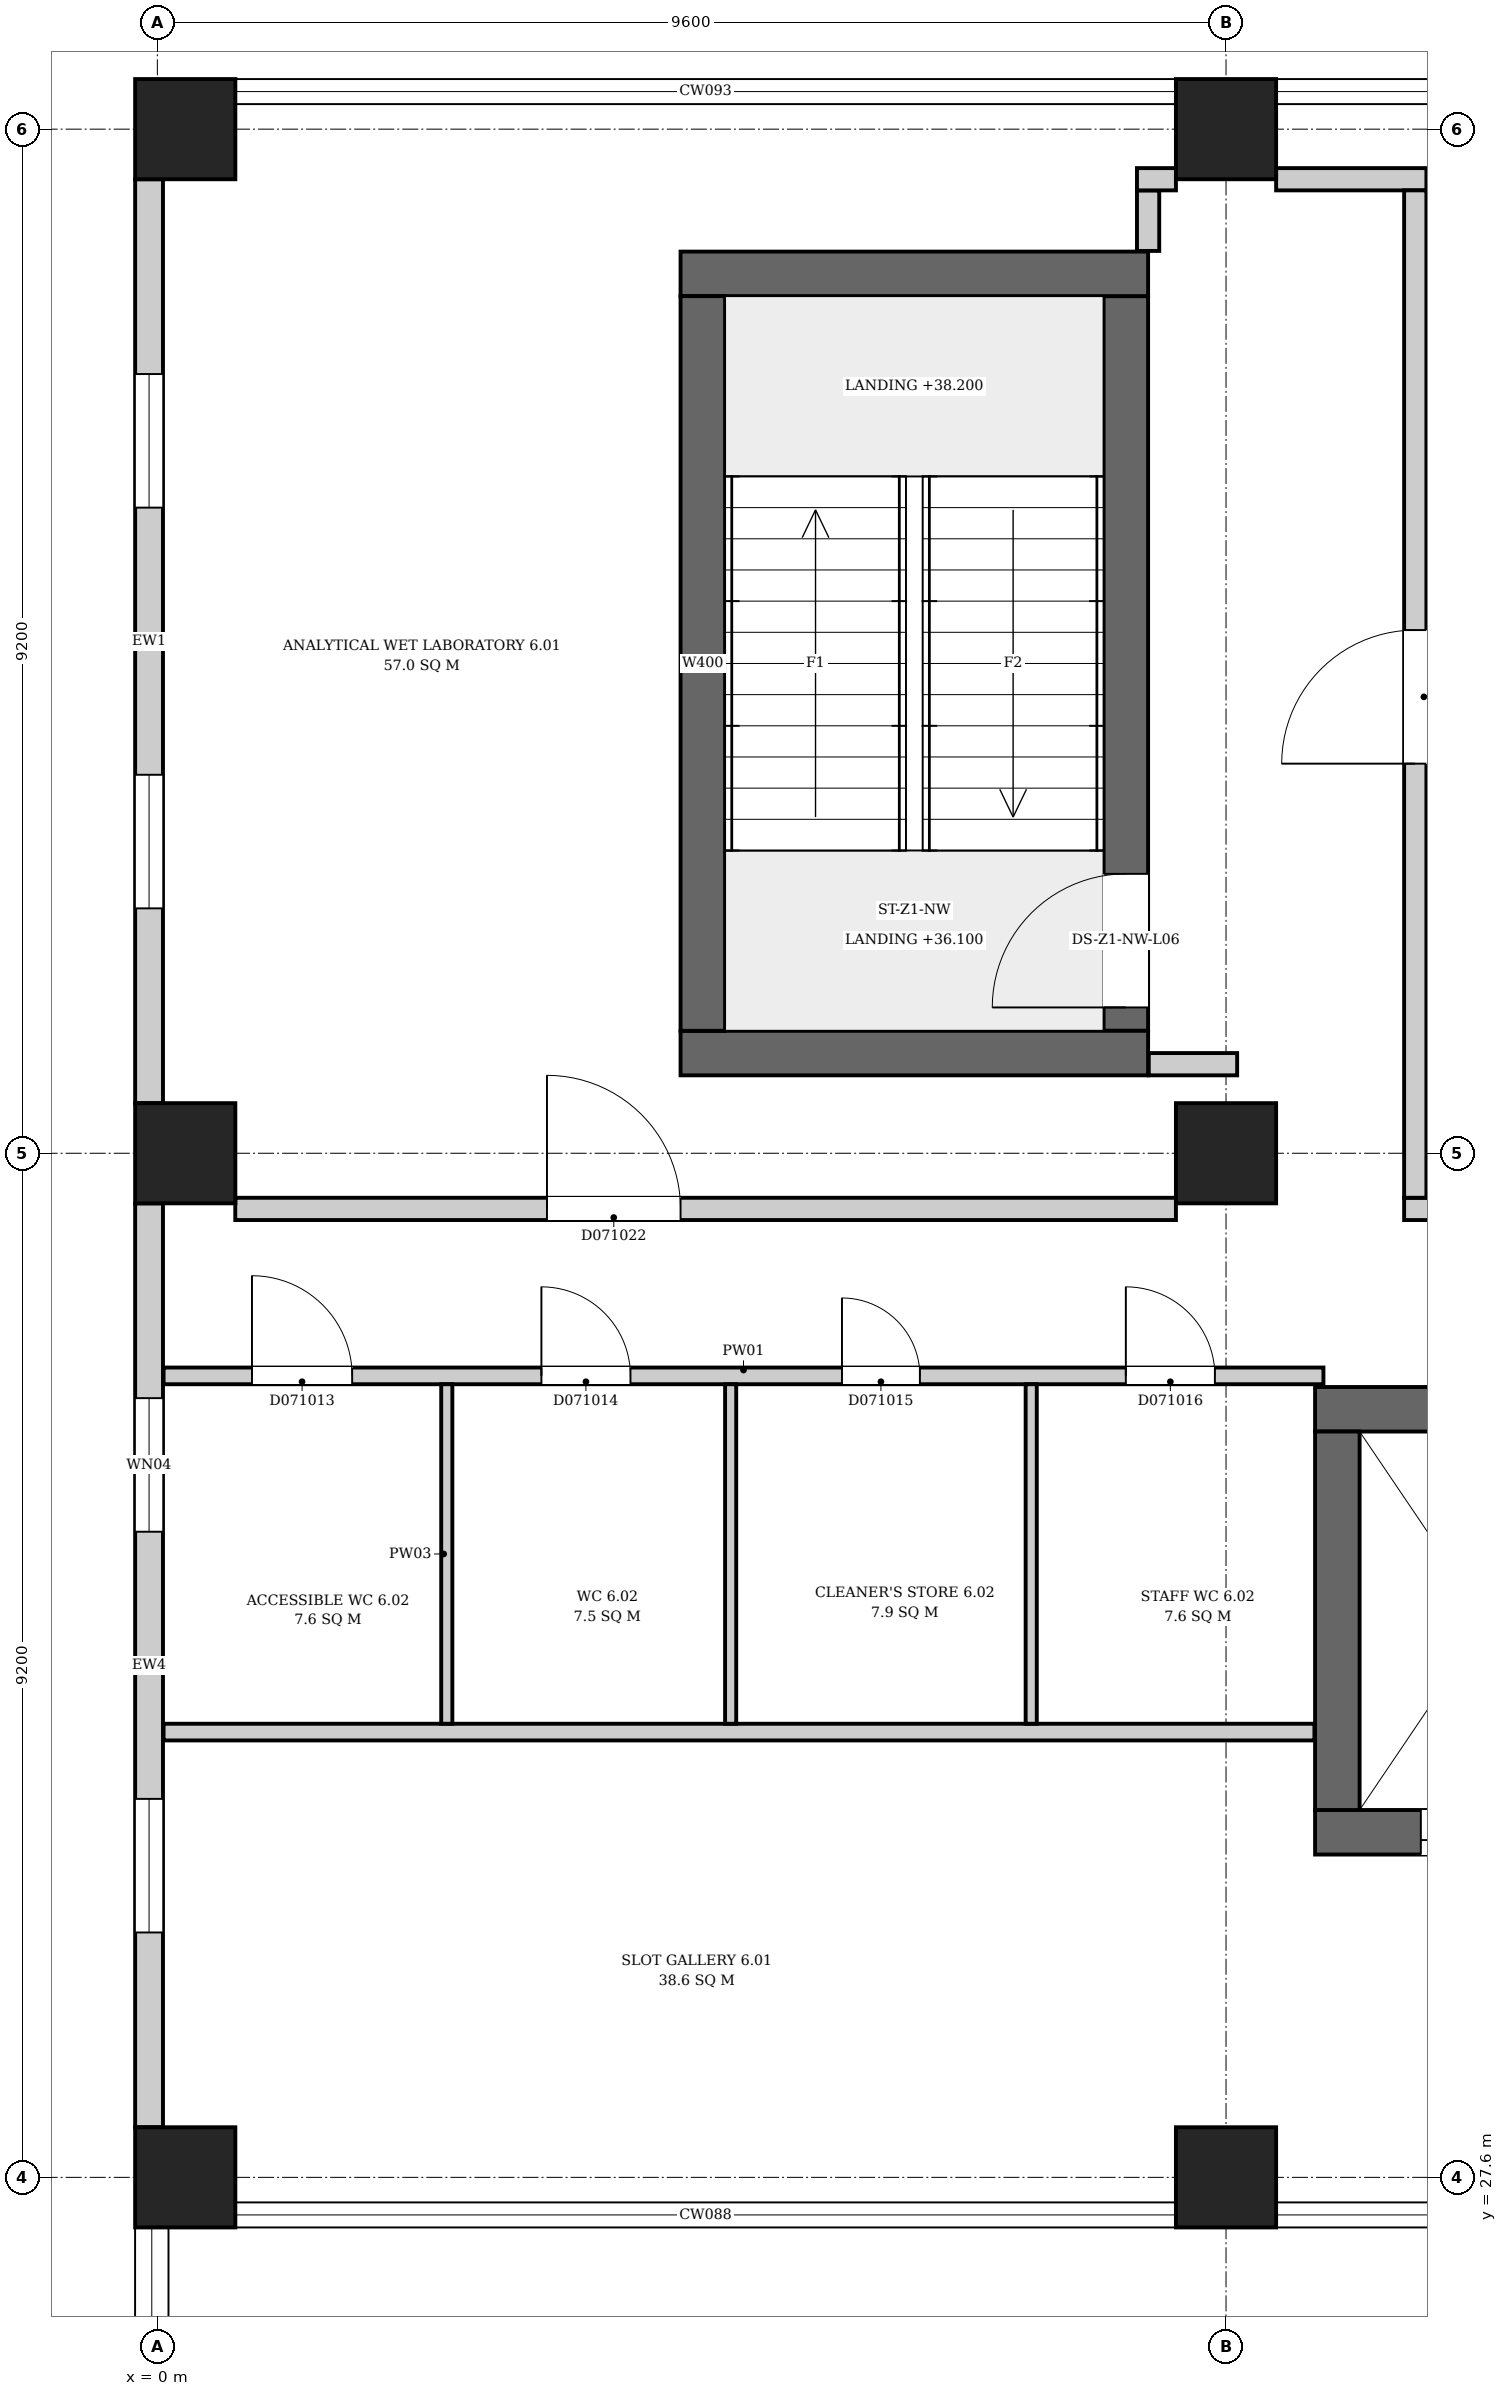
"""IFC4 building model, lengths in metres.
Left out: names, types, materials, properties, quantities, classifications, styles, units other than length and angle.
Written with IfcOpenShell. Run it as: python <this file> out.ifc"""

import sys

from ifc_helpers import new_model, si_unit, direction, frame, frame_2d, origin, origin_2d, place, context, subcontext, project, spatial, rectangle, extrude, element, fill, save


model = new_model("IFC4")
c1 = context("Model", 3, precision=1e-05, world=origin(), true_north=direction((0.0, 1.0)))
c2 = subcontext(c1, "Body", "Model", "MODEL_VIEW")
j1 = project(units=[si_unit("LENGTHUNIT", "METRE"), si_unit("PLANEANGLEUNIT", "RADIAN")], contexts=[c1])
p1 = place(None, origin())
s1 = spatial("IfcSite", under=j1, at=p1, CompositionType="ELEMENT")
p2 = place(p1, origin())
s2 = spatial("IfcBuilding", under=s1, at=p2, CompositionType="ELEMENT")
p3 = place(p2, frame((0.0, 0.0, 36.1)))
s3 = spatial("IfcBuildingStorey", under=s2, at=p3, CompositionType="ELEMENT", Elevation=36.1)
for number, where, z_axis, x_axis in (
    (1, (4.7, 37.7, 0.0), (0.0, 0.0, 1.0), (1.0, 0.0, 0.0)),
    (2, (4.7, 44.7, 0.0), (0.0, 0.0, 1.0), (1.0, 0.0, 0.0)),
):
    element("IfcWall", number, at=place(p3, frame(where, z_axis=z_axis, x_axis=x_axis)), inside=s3, PredefinedType="SHEAR", context=c2, shape_type="SweptSolid", body=[
        extrude(rectangle(XDim=4.2, YDim=0.4, at=frame_2d((2.1, 0.0))), origin(), (0.0, 0.0, 1.0), 4.2),
    ])
p4 = place(p3, frame((4.9, 37.9, 0.0), z_axis=(0.0, 0.0, 1.0), x_axis=(0.0, 1.0, 0.0)))
e3 = element("IfcWall", 3, at=p4, inside=s3, PredefinedType="SHEAR", context=c2, shape_type="SweptSolid", body=[
    extrude(rectangle(XDim=6.6, YDim=0.4, at=frame_2d((3.3, 0.0))), origin(), (0.0, 0.0, 1.0), 4.2),
])
p5 = place(p3, frame((8.7, 37.9, 0.0), z_axis=(0.0, 0.0, 1.0), x_axis=(0.0, 1.0, 0.0)))
e4 = element("IfcWall", 4, at=p5, inside=s3, PredefinedType="SHEAR", context=c2, shape_type="SweptSolid", body=[
    extrude(rectangle(XDim=6.6, YDim=0.4, at=frame_2d((3.3, 0.0))), origin(), (0.0, 0.0, 1.0), 4.2),
])
p6 = place(p5, frame((0.21, 0.0, 0.0)))
e5 = element("IfcOpeningElement", 5, at=p6, cuts=e4, PredefinedType="OPENING", context=c2, shape_type="SweptSolid", body=[
    extrude(rectangle(XDim=1.2, YDim=2.1, at=frame_2d((0.6, 1.05))), frame((0.0, 0.21, 0.0), z_axis=(0.0, -1.0, 0.0), x_axis=(1.0, 0.0, 0.0)), (0.0, 0.0, 1.0), 0.42),
])
p7 = place(p3, frame((10.4, 30.7, 0.0), z_axis=(0.0, 0.0, 1.0), x_axis=(1.0, 0.0, 0.0)))
e6 = element("IfcWall", 6, at=p7, inside=s3, PredefinedType="SHEAR", context=c2, shape_type="SweptSolid", body=[
    extrude(rectangle(XDim=3.1, YDim=0.4, at=frame_2d((1.55, 0.0))), origin(), (0.0, 0.0, 1.0), 4.2),
])
p8 = place(p7, frame((0.95, 0.0, 0.0)))
e7 = element("IfcOpeningElement", 7, at=p8, cuts=e6, PredefinedType="OPENING", context=c2, shape_type="SweptSolid", body=[
    extrude(rectangle(XDim=1.2, YDim=2.1, at=frame_2d((0.6, 1.05))), frame((0.0, 0.21, 0.0), z_axis=(0.0, -1.0, 0.0), x_axis=(1.0, 0.0, 0.0)), (0.0, 0.0, 1.0), 0.42),
])
p9 = place(p3, frame((10.4, 34.5, 0.0), z_axis=(0.0, 0.0, 1.0), x_axis=(1.0, 0.0, 0.0)))
e8 = element("IfcWall", 8, at=p9, inside=s3, PredefinedType="SHEAR", context=c2, shape_type="SweptSolid", body=[
    extrude(rectangle(XDim=3.1, YDim=0.4, at=frame_2d((1.55, 0.0))), origin(), (0.0, 0.0, 1.0), 4.2),
])
p10 = place(p3, frame((10.6, 30.9, 0.0), z_axis=(0.0, 0.0, 1.0), x_axis=(0.0, 1.0, 0.0)))
e9 = element("IfcWall", 9, at=p10, inside=s3, PredefinedType="SHEAR", context=c2, shape_type="SweptSolid", body=[
    extrude(rectangle(XDim=3.4, YDim=0.4, at=frame_2d((1.7, 0.0))), origin(), (0.0, 0.0, 1.0), 4.2),
])
for number, where, z_axis, x_axis in (
    (10, (0.25, 27.6, 0.0), (0.0, 0.0, 1.0), (1.0, 0.0, 0.0)),
    (11, (9.6, 27.6, 0.0), (0.0, 0.0, 1.0), (1.0, 0.0, 0.0)),
    (12, (0.25, 36.8, 0.0), (0.0, 0.0, 1.0), (1.0, 0.0, 0.0)),
    (13, (9.6, 36.8, 0.0), (0.0, 0.0, 1.0), (1.0, 0.0, 0.0)),
    (14, (0.25, 46.0, 0.0), (0.0, 0.0, 1.0), (1.0, 0.0, 0.0)),
    (15, (9.6, 46.0, 0.0), (0.0, 0.0, 1.0), (1.0, 0.0, 0.0)),
):
    element("IfcColumn", number, at=place(p3, frame(where, z_axis=z_axis, x_axis=x_axis)), inside=s3, PredefinedType="COLUMN", context=c2, shape_type="SweptSolid", body=[
        extrude(rectangle(XDim=0.9, YDim=0.9, at=origin_2d()), origin(), (0.0, 0.0, 1.0), 4.2),
    ])
p11 = place(p3, frame((-0.074, 36.35, 0.0), z_axis=(0.0, 0.0, 1.0), x_axis=(0.0, -1.0, 0.0)))
e16 = element("IfcWall", 16, at=p11, inside=s3, PredefinedType="ELEMENTEDWALL", context=c2, shape_type="SweptSolid", body=[
    extrude(rectangle(XDim=8.3, YDim=0.25, at=frame_2d((4.15, 0.0))), origin(), (0.0, 0.0, 1.0), 3.9),
])
p12 = place(p11, frame((5.35, 0.0, 0.9)))
e17 = element("IfcOpeningElement", 17, at=p12, cuts=e16, PredefinedType="OPENING", context=c2, shape_type="SweptSolid", body=[
    extrude(rectangle(XDim=1.2, YDim=2.6, at=frame_2d((0.6, 1.3))), frame((0.0, 0.135, 0.0), z_axis=(0.0, -1.0, 0.0), x_axis=(1.0, 0.0, 0.0)), (0.0, 0.0, 1.0), 0.27),
])
p13 = place(p11, frame((1.75, 0.0, 0.9)))
e18 = element("IfcOpeningElement", 18, at=p13, cuts=e16, PredefinedType="OPENING", context=c2, shape_type="SweptSolid", body=[
    extrude(rectangle(XDim=1.2, YDim=2.6, at=frame_2d((0.6, 1.3))), frame((0.0, 0.135, 0.0), z_axis=(0.0, -1.0, 0.0), x_axis=(1.0, 0.0, 0.0)), (0.0, 0.0, 1.0), 0.27),
])
p14 = place(p3, frame((-0.074, 45.55, 0.0), z_axis=(0.0, 0.0, 1.0), x_axis=(0.0, -1.0, 0.0)))
e19 = element("IfcWall", 19, at=p14, inside=s3, PredefinedType="ELEMENTEDWALL", context=c2, shape_type="SweptSolid", body=[
    extrude(rectangle(XDim=8.3, YDim=0.25, at=frame_2d((4.15, 0.0))), origin(), (0.0, 0.0, 1.0), 3.9),
])
p15 = place(p14, frame((5.35, 0.0, 0.9)))
e20 = element("IfcOpeningElement", 20, at=p15, cuts=e19, PredefinedType="OPENING", context=c2, shape_type="SweptSolid", body=[
    extrude(rectangle(XDim=1.2, YDim=2.6, at=frame_2d((0.6, 1.3))), frame((0.0, 0.135, 0.0), z_axis=(0.0, -1.0, 0.0), x_axis=(1.0, 0.0, 0.0)), (0.0, 0.0, 1.0), 0.27),
])
p16 = place(p14, frame((1.75, 0.0, 0.9)))
e21 = element("IfcOpeningElement", 21, at=p16, cuts=e19, PredefinedType="OPENING", context=c2, shape_type="SweptSolid", body=[
    extrude(rectangle(XDim=1.2, YDim=2.6, at=frame_2d((0.6, 1.3))), frame((0.0, 0.135, 0.0), z_axis=(0.0, -1.0, 0.0), x_axis=(1.0, 0.0, 0.0)), (0.0, 0.0, 1.0), 0.27),
])
p17 = place(p3, frame((0.056, 31.6, 0.0), z_axis=(0.0, 0.0, 1.0), x_axis=(1.0, 0.0, 0.0)))
e22 = element("IfcWall", 22, at=p17, inside=s3, PredefinedType="PARTITIONING", context=c2, shape_type="SweptSolid", body=[
    extrude(rectangle(XDim=10.338, YDim=0.15, at=frame_2d((5.169, 0.0))), origin(), (0.0, 0.0, 1.0), 3.9),
])
p18 = place(p3, frame((0.056, 34.8, 0.0), z_axis=(0.0, 0.0, 1.0), x_axis=(1.0, 0.0, 0.0)))
e23 = element("IfcWall", 23, at=p18, inside=s3, PredefinedType="PARTITIONING", context=c2, shape_type="SweptSolid", body=[
    extrude(rectangle(XDim=10.419, YDim=0.15, at=frame_2d((5.209, 0.0))), origin(), (0.0, 0.0, 1.0), 3.9),
])
p19 = place(p18, frame((0.794, 0.0, 0.0)))
e24 = element("IfcOpeningElement", 24, at=p19, cuts=e23, PredefinedType="OPENING", context=c2, shape_type="SweptSolid", body=[
    extrude(rectangle(XDim=0.9, YDim=2.1, at=frame_2d((0.45, 1.05))), frame((0.0, 0.085, 0.0), z_axis=(0.0, -1.0, 0.0), x_axis=(1.0, 0.0, 0.0)), (0.0, 0.0, 1.0), 0.17),
])
p20 = place(p18, frame((3.394, 0.0, 0.0)))
e25 = element("IfcOpeningElement", 25, at=p20, cuts=e23, PredefinedType="OPENING", context=c2, shape_type="SweptSolid", body=[
    extrude(rectangle(XDim=0.8, YDim=2.1, at=frame_2d((0.4, 1.05))), frame((0.0, 0.085, 0.0), z_axis=(0.0, -1.0, 0.0), x_axis=(1.0, 0.0, 0.0)), (0.0, 0.0, 1.0), 0.17),
])
p21 = place(p18, frame((6.094, 0.0, 0.0)))
e26 = element("IfcOpeningElement", 26, at=p21, cuts=e23, PredefinedType="OPENING", context=c2, shape_type="SweptSolid", body=[
    extrude(rectangle(XDim=0.7, YDim=2.1, at=frame_2d((0.35, 1.05))), frame((0.0, 0.085, 0.0), z_axis=(0.0, -1.0, 0.0), x_axis=(1.0, 0.0, 0.0)), (0.0, 0.0, 1.0), 0.17),
])
p22 = place(p18, frame((8.644, 0.0, 0.0)))
e27 = element("IfcOpeningElement", 27, at=p22, cuts=e23, PredefinedType="OPENING", context=c2, shape_type="SweptSolid", body=[
    extrude(rectangle(XDim=0.8, YDim=2.1, at=frame_2d((0.4, 1.05))), frame((0.0, 0.085, 0.0), z_axis=(0.0, -1.0, 0.0), x_axis=(1.0, 0.0, 0.0)), (0.0, 0.0, 1.0), 0.17),
])
p23 = place(p3, frame((0.7, 36.3, 0.0), z_axis=(0.0, 0.0, 1.0), x_axis=(1.0, 0.0, 0.0)))
e28 = element("IfcWall", 28, at=p23, inside=s3, PredefinedType="PARTITIONING", context=c2, shape_type="SweptSolid", body=[
    extrude(rectangle(XDim=8.45, YDim=0.2, at=frame_2d((4.225, 0.0))), origin(), (0.0, 0.0, 1.0), 3.9),
])
p24 = place(p23, frame((2.8, 0.0, 0.0)))
e29 = element("IfcOpeningElement", 29, at=p24, cuts=e28, PredefinedType="OPENING", context=c2, shape_type="SweptSolid", body=[
    extrude(rectangle(XDim=1.2, YDim=2.1, at=frame_2d((0.6, 1.05))), frame((0.0, 0.11, 0.0), z_axis=(0.0, -1.0, 0.0), x_axis=(1.0, 0.0, 0.0)), (0.0, 0.0, 1.0), 0.22),
])
for number, where, z_axis, x_axis in (
    (30, (2.6, 31.675, 0.0), (0.0, 0.0, 1.0), (0.0, 1.0, 0.0)),
    (31, (5.15, 31.675, 0.0), (0.0, 0.0, 1.0), (0.0, 1.0, 0.0)),
    (32, (7.85, 31.675, 0.0), (0.0, 0.0, 1.0), (0.0, 1.0, 0.0)),
):
    element("IfcWall", number, at=place(p3, frame(where, z_axis=z_axis, x_axis=x_axis)), inside=s3, PredefinedType="PARTITIONING", context=c2, shape_type="SweptSolid", body=[
        extrude(rectangle(XDim=3.05, YDim=0.1, at=frame_2d((1.525, 0.0))), origin(), (0.0, 0.0, 1.0), 3.9),
    ])
p25 = place(p3, frame((8.9, 44.906, 0.0), z_axis=(0.0, 0.0, 1.0), x_axis=(0.0, 1.0, 0.0)))
e33 = element("IfcWall", 33, at=p25, inside=s3, PredefinedType="PARTITIONING", context=c2, shape_type="SweptSolid", body=[
    extrude(rectangle(XDim=0.544, YDim=0.2, at=frame_2d((0.272, 0.0))), origin(), (0.0, 0.0, 1.0), 3.9),
])
p26 = place(p3, frame((8.8, 45.55, 0.0), z_axis=(0.0, 0.0, 1.0), x_axis=(1.0, 0.0, 0.0)))
e34 = element("IfcWall", 34, at=p26, inside=s3, PredefinedType="PARTITIONING", context=c2, shape_type="SweptSolid", body=[
    extrude(rectangle(XDim=0.35, YDim=0.2, at=frame_2d((0.175, 0.0))), origin(), (0.0, 0.0, 1.0), 3.9),
])
p27 = place(p3, frame((8.906, 37.6, 0.0), z_axis=(0.0, 0.0, 1.0), x_axis=(1.0, 0.0, 0.0)))
e35 = element("IfcWall", 35, at=p27, inside=s3, PredefinedType="PARTITIONING", context=c2, shape_type="SweptSolid", body=[
    extrude(rectangle(XDim=0.794, YDim=0.2, at=frame_2d((0.397, 0.0))), origin(), (0.0, 0.0, 1.0), 3.9),
])
p28 = place(p3, frame((10.05, 45.55, 0.0), z_axis=(0.0, 0.0, 1.0), x_axis=(1.0, 0.0, 0.0)))
e36 = element("IfcWall", 36, at=p28, inside=s3, PredefinedType="PARTITIONING", context=c2, shape_type="SweptSolid", body=[
    extrude(rectangle(XDim=1.35, YDim=0.2, at=frame_2d((0.675, 0.0))), origin(), (0.0, 0.0, 1.0), 3.9),
])
p29 = place(p3, frame((11.2, 36.3, 0.0), z_axis=(0.0, 0.0, 1.0), x_axis=(1.0, 0.0, 0.0)))
e37 = element("IfcWall", 37, at=p29, inside=s3, PredefinedType="PARTITIONING", context=c2, shape_type="SweptSolid", body=[
    extrude(rectangle(XDim=7.55, YDim=0.2, at=frame_2d((3.775, 0.0))), origin(), (0.0, 0.0, 1.0), 3.9),
])
p30 = place(p3, frame((11.3, 36.4, 0.0), z_axis=(0.0, 0.0, 1.0), x_axis=(0.0, 1.0, 0.0)))
e38 = element("IfcWall", 38, at=p30, inside=s3, PredefinedType="PARTITIONING", context=c2, shape_type="SweptSolid", body=[
    extrude(rectangle(XDim=9.05, YDim=0.2, at=frame_2d((4.525, 0.0))), origin(), (0.0, 0.0, 1.0), 3.9),
])
p31 = place(p30, frame((3.9, 0.0, 0.0)))
e39 = element("IfcOpeningElement", 39, at=p31, cuts=e38, PredefinedType="OPENING", context=c2, shape_type="SweptSolid", body=[
    extrude(rectangle(XDim=1.2, YDim=2.1, at=frame_2d((0.6, 1.05))), frame((0.0, 0.11, 0.0), z_axis=(0.0, -1.0, 0.0), x_axis=(1.0, 0.0, 0.0)), (0.0, 0.0, 1.0), 0.22),
])
p32 = place(p12, origin())
e40 = element("IfcWindow", 40, at=p32, inside=s3, PartitioningType="SINGLE_PANEL", PredefinedType="WINDOW", context=c2, shape_type="SweptSolid", body=[
    extrude(rectangle(XDim=1.2, YDim=2.6, at=frame_2d((0.6, 1.3))), frame((0.0, 0.03, 0.0), z_axis=(0.0, -1.0, 0.0), x_axis=(1.0, 0.0, 0.0)), (0.0, 0.0, 1.0), 0.06),
])
fill(e17, e40)
p33 = place(p13, origin())
e41 = element("IfcWindow", 41, at=p33, inside=s3, PartitioningType="SINGLE_PANEL", PredefinedType="WINDOW", context=c2, shape_type="SweptSolid", body=[
    extrude(rectangle(XDim=1.2, YDim=2.6, at=frame_2d((0.6, 1.3))), frame((0.0, 0.03, 0.0), z_axis=(0.0, -1.0, 0.0), x_axis=(1.0, 0.0, 0.0)), (0.0, 0.0, 1.0), 0.06),
])
fill(e18, e41)
p34 = place(p15, origin())
e42 = element("IfcWindow", 42, at=p34, inside=s3, PartitioningType="SINGLE_PANEL", PredefinedType="WINDOW", context=c2, shape_type="SweptSolid", body=[
    extrude(rectangle(XDim=1.2, YDim=2.6, at=frame_2d((0.6, 1.3))), frame((0.0, 0.03, 0.0), z_axis=(0.0, -1.0, 0.0), x_axis=(1.0, 0.0, 0.0)), (0.0, 0.0, 1.0), 0.06),
])
fill(e20, e42)
p35 = place(p16, origin())
e43 = element("IfcWindow", 43, at=p35, inside=s3, PartitioningType="SINGLE_PANEL", PredefinedType="WINDOW", context=c2, shape_type="SweptSolid", body=[
    extrude(rectangle(XDim=1.2, YDim=2.6, at=frame_2d((0.6, 1.3))), frame((0.0, 0.03, 0.0), z_axis=(0.0, -1.0, 0.0), x_axis=(1.0, 0.0, 0.0)), (0.0, 0.0, 1.0), 0.06),
])
fill(e21, e43)
p36 = place(p6, origin())
e44 = element("IfcDoor", 44, at=p36, inside=s3, OperationType="SINGLE_SWING_RIGHT", PredefinedType="DOOR", context=c2, shape_type="SweptSolid", body=[
    extrude(rectangle(XDim=1.2, YDim=2.1, at=frame_2d((0.6, 1.05))), frame((0.0, 0.025, 0.0), z_axis=(0.0, -1.0, 0.0), x_axis=(1.0, 0.0, 0.0)), (0.0, 0.0, 1.0), 0.05),
])
fill(e5, e44)
p37 = place(p8, origin())
e45 = element("IfcDoor", 45, at=p37, inside=s3, OperationType="DOUBLE_DOOR_SLIDING", PredefinedType="DOOR", context=c2, shape_type="SweptSolid", body=[
    extrude(rectangle(XDim=1.2, YDim=2.1, at=frame_2d((0.6, 1.05))), frame((0.0, 0.025, 0.0), z_axis=(0.0, -1.0, 0.0), x_axis=(1.0, 0.0, 0.0)), (0.0, 0.0, 1.0), 0.05),
])
fill(e7, e45)
p38 = place(p19, origin())
e46 = element("IfcDoor", 46, at=p38, inside=s3, OperationType="SINGLE_SWING_LEFT", PredefinedType="DOOR", context=c2, shape_type="SweptSolid", body=[
    extrude(rectangle(XDim=0.9, YDim=2.1, at=frame_2d((0.45, 1.05))), frame((0.0, 0.025, 0.0), z_axis=(0.0, -1.0, 0.0), x_axis=(1.0, 0.0, 0.0)), (0.0, 0.0, 1.0), 0.05),
])
fill(e24, e46)
p39 = place(p20, origin())
e47 = element("IfcDoor", 47, at=p39, inside=s3, OperationType="SINGLE_SWING_LEFT", PredefinedType="DOOR", context=c2, shape_type="SweptSolid", body=[
    extrude(rectangle(XDim=0.8, YDim=2.1, at=frame_2d((0.4, 1.05))), frame((0.0, 0.025, 0.0), z_axis=(0.0, -1.0, 0.0), x_axis=(1.0, 0.0, 0.0)), (0.0, 0.0, 1.0), 0.05),
])
fill(e25, e47)
p40 = place(p21, origin())
e48 = element("IfcDoor", 48, at=p40, inside=s3, OperationType="SINGLE_SWING_LEFT", PredefinedType="DOOR", context=c2, shape_type="SweptSolid", body=[
    extrude(rectangle(XDim=0.7, YDim=2.1, at=frame_2d((0.35, 1.05))), frame((0.0, 0.025, 0.0), z_axis=(0.0, -1.0, 0.0), x_axis=(1.0, 0.0, 0.0)), (0.0, 0.0, 1.0), 0.05),
])
fill(e26, e48)
p41 = place(p22, origin())
e49 = element("IfcDoor", 49, at=p41, inside=s3, OperationType="SINGLE_SWING_LEFT", PredefinedType="DOOR", context=c2, shape_type="SweptSolid", body=[
    extrude(rectangle(XDim=0.8, YDim=2.1, at=frame_2d((0.4, 1.05))), frame((0.0, 0.025, 0.0), z_axis=(0.0, -1.0, 0.0), x_axis=(1.0, 0.0, 0.0)), (0.0, 0.0, 1.0), 0.05),
])
fill(e27, e49)
p42 = place(p24, origin())
e50 = element("IfcDoor", 50, at=p42, inside=s3, OperationType="SINGLE_SWING_RIGHT", PredefinedType="DOOR", context=c2, shape_type="SweptSolid", body=[
    extrude(rectangle(XDim=1.2, YDim=2.1, at=frame_2d((0.6, 1.05))), frame((0.0, 0.025, 0.0), z_axis=(0.0, -1.0, 0.0), x_axis=(1.0, 0.0, 0.0)), (0.0, 0.0, 1.0), 0.05),
])
fill(e29, e50)
p43 = place(p31, origin())
e51 = element("IfcDoor", 51, at=p43, inside=s3, OperationType="SINGLE_SWING_LEFT", PredefinedType="DOOR", context=c2, shape_type="SweptSolid", body=[
    extrude(rectangle(XDim=1.2, YDim=2.1, at=frame_2d((0.6, 1.05))), frame((0.0, 0.025, 0.0), z_axis=(0.0, -1.0, 0.0), x_axis=(1.0, 0.0, 0.0)), (0.0, 0.0, 1.0), 0.05),
])
fill(e39, e51)
save(model, sys.argv[1])
